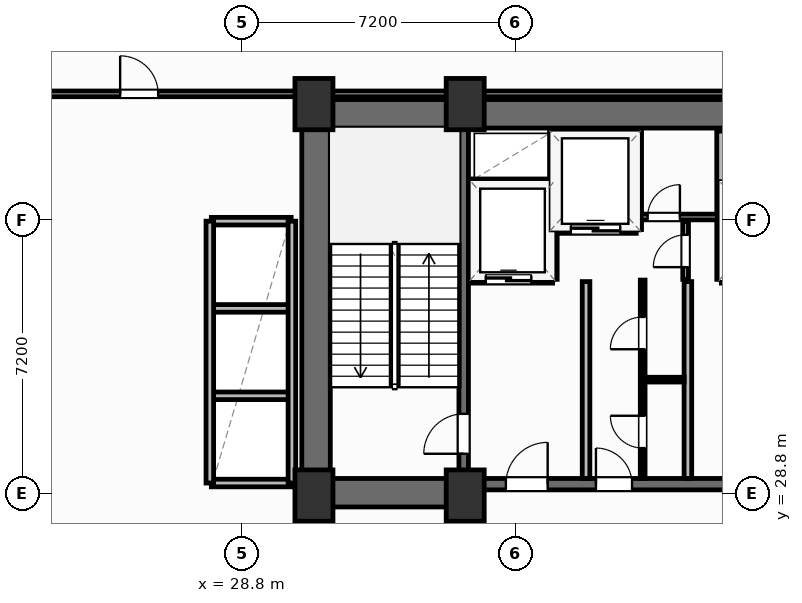
"""IFC4 building model, lengths in metres.
Left out: names, types, materials, properties, quantities, classifications, styles, units other than length and angle.
Written with IfcOpenShell. Run it as: python <this file> out.ifc"""

import sys

from ifc_helpers import new_model, si_unit, direction, frame, frame_2d, origin, origin_2d, place, context, subcontext, project, spatial, rectangle, extrude, element, fill, save


model = new_model("IFC4")
c1 = context("Model", 3, precision=1e-05, world=origin(), true_north=direction((0.0, 1.0)))
c2 = subcontext(c1, "Body", "Model", "MODEL_VIEW")
j1 = project(units=[si_unit("LENGTHUNIT", "METRE"), si_unit("PLANEANGLEUNIT", "RADIAN")], contexts=[c1])
p1 = place(None, origin())
s1 = spatial("IfcSite", under=j1, at=p1, CompositionType="ELEMENT")
p2 = place(p1, origin())
s2 = spatial("IfcBuilding", under=s1, at=p2, CompositionType="ELEMENT")
p3 = place(p2, frame((0.0, 0.0, 116.9)))
s3 = spatial("IfcBuildingStorey", under=s2, at=p3, CompositionType="ELEMENT", Elevation=116.9)
for number, where, z_axis, x_axis in (
    (1, (30.7, 28.75, 0.0), (0.0, 0.0, 1.0), (1.0, 0.0, 0.0)),
    (2, (34.68, 28.75, 0.0), (0.0, 0.0, 1.0), (1.0, 0.0, 0.0)),
    (3, (30.7, 39.05, 0.0), (0.0, 0.0, 1.0), (1.0, 0.0, 0.0)),
    (4, (34.68, 39.05, 0.0), (0.0, 0.0, 1.0), (1.0, 0.0, 0.0)),
):
    element("IfcColumn", number, at=place(p3, frame(where, z_axis=z_axis, x_axis=x_axis)), inside=s3, PredefinedType="COLUMN", context=c2, shape_type="SweptSolid", body=[
        extrude(rectangle(XDim=1.0, YDim=1.35, at=origin_2d()), origin(), (0.0, 0.0, 1.0), 4.8),
    ])
p4 = place(p3, frame((30.38, 38.795, 0.0), z_axis=(0.0, 0.0, 1.0), x_axis=(1.0, 0.0, 0.0)))
e5 = element("IfcWall", 5, at=p4, inside=s3, PredefinedType="SHEAR", context=c2, shape_type="SweptSolid", body=[
    extrude(rectangle(XDim=17.64, YDim=0.75, at=frame_2d((8.82, 0.0))), origin(), (0.0, 0.0, 1.0), 4.55),
])
p5 = place(p3, frame((30.755, 29.2, 0.0), z_axis=(0.0, 0.0, 1.0), x_axis=(0.0, 1.0, 0.0)))
e6 = element("IfcWall", 6, at=p5, inside=s3, PredefinedType="SHEAR", context=c2, shape_type="SweptSolid", body=[
    extrude(rectangle(XDim=9.22, YDim=0.75, at=frame_2d((4.61, 0.0))), origin(), (0.0, 0.0, 1.0), 4.55),
])
p6 = place(p3, frame((30.38, 28.825, 0.0), z_axis=(0.0, 0.0, 1.0), x_axis=(1.0, 0.0, 0.0)))
e7 = element("IfcWall", 7, at=p6, inside=s3, PredefinedType="SHEAR", context=c2, shape_type="SweptSolid", body=[
    extrude(rectangle(XDim=4.42, YDim=0.75, at=frame_2d((2.21, 0.0))), origin(), (0.0, 0.0, 1.0), 4.55),
])
p7 = place(p3, frame((34.8, 29.05, 0.0), z_axis=(0.0, 0.0, 1.0), x_axis=(1.0, 0.0, 0.0)))
e8 = element("IfcWall", 8, at=p7, inside=s3, PredefinedType="SHEAR", context=c2, shape_type="SweptSolid", body=[
    extrude(rectangle(XDim=8.8, YDim=0.3, at=frame_2d((4.4, 0.0))), origin(), (0.0, 0.0, 1.0), 4.55),
])
p8 = place(p7, frame((0.95, 0.0, 0.0)))
e9 = element("IfcOpeningElement", 9, at=p8, cuts=e8, PredefinedType="OPENING", context=c2, shape_type="SweptSolid", body=[
    extrude(rectangle(XDim=1.1, YDim=2.15, at=frame_2d((0.55, 1.075))), frame((0.0, 0.16, 0.0), z_axis=(0.0, -1.0, 0.0), x_axis=(1.0, 0.0, 0.0)), (0.0, 0.0, 1.0), 0.32),
])
p9 = place(p7, frame((6.75, 0.0, 0.0)))
e10 = element("IfcOpeningElement", 10, at=p9, cuts=e8, PredefinedType="OPENING", context=c2, shape_type="SweptSolid", body=[
    extrude(rectangle(XDim=1.1, YDim=2.15, at=frame_2d((0.55, 1.075))), frame((0.0, 0.16, 0.0), z_axis=(0.0, -1.0, 0.0), x_axis=(1.0, 0.0, 0.0)), (0.0, 0.0, 1.0), 0.32),
])
p10 = place(p7, frame((3.32, 0.0, 0.0)))
e11 = element("IfcOpeningElement", 11, at=p10, cuts=e8, PredefinedType="OPENING", context=c2, shape_type="SweptSolid", body=[
    extrude(rectangle(XDim=0.95, YDim=2.15, at=frame_2d((0.475, 1.075))), frame((0.0, 0.16, 0.0), z_axis=(0.0, -1.0, 0.0), x_axis=(1.0, 0.0, 0.0)), (0.0, 0.0, 1.0), 0.32),
])
p11 = place(p3, frame((34.64, 29.2, 0.0), z_axis=(0.0, 0.0, 1.0), x_axis=(0.0, 1.0, 0.0)))
e12 = element("IfcWall", 12, at=p11, inside=s3, PredefinedType="SHEAR", context=c2, shape_type="SweptSolid", body=[
    extrude(rectangle(XDim=9.22, YDim=0.25, at=frame_2d((4.61, 0.0))), origin(), (0.0, 0.0, 1.0), 4.55),
])
p12 = place(p11, frame((0.65, 0.0, 0.0)))
e13 = element("IfcOpeningElement", 13, at=p12, cuts=e12, PredefinedType="OPENING", context=c2, shape_type="SweptSolid", body=[
    extrude(rectangle(XDim=1.05, YDim=2.15, at=frame_2d((0.525, 1.075))), frame((0.0, 0.135, 0.0), z_axis=(0.0, -1.0, 0.0), x_axis=(1.0, 0.0, 0.0)), (0.0, 0.0, 1.0), 0.27),
])
p13 = place(p3, frame((10.0, 39.32, 0.0), z_axis=(0.0, 0.0, 1.0), x_axis=(1.0, 0.0, 0.0)))
e14 = element("IfcWall", 14, at=p13, inside=s3, PredefinedType="PARTITIONING", context=c2, shape_type="SweptSolid", body=[
    extrude(rectangle(XDim=62.0, YDim=0.15, at=frame_2d((31.0, 0.0))), origin(), (0.0, 0.0, 1.0), 4.55),
])
p14 = place(p13, frame((15.6, 0.0, 0.0)))
e15 = element("IfcOpeningElement", 15, at=p14, cuts=e14, PredefinedType="OPENING", context=c2, shape_type="SweptSolid", body=[
    extrude(rectangle(XDim=1.0, YDim=2.05, at=frame_2d((0.5, 1.025))), frame((0.0, 0.085, 0.0), z_axis=(0.0, -1.0, 0.0), x_axis=(1.0, 0.0, 0.0)), (0.0, 0.0, 1.0), 0.17),
])
p15 = place(p13, frame((39.5, 0.0, 0.0)))
e16 = element("IfcOpeningElement", 16, at=p15, cuts=e14, PredefinedType="OPENING", context=c2, shape_type="SweptSolid", body=[
    extrude(rectangle(XDim=2.0, YDim=2.05, at=frame_2d((1.0, 1.025))), frame((0.0, 0.085, 0.0), z_axis=(0.0, -1.0, 0.0), x_axis=(1.0, 0.0, 0.0)), (0.0, 0.0, 1.0), 0.17),
])
for number, where, z_axis, x_axis in (
    (17, (37.86, 29.2, 0.0), (0.0, 0.0, 1.0), (0.0, 1.0, 0.0)),
    (18, (40.54, 29.2, 0.0), (0.0, 0.0, 1.0), (0.0, 1.0, 0.0)),
):
    element("IfcWall", number, at=place(p3, frame(where, z_axis=z_axis, x_axis=x_axis)), inside=s3, PredefinedType="PARTITIONING", context=c2, shape_type="SweptSolid", body=[
        extrude(rectangle(XDim=5.18, YDim=0.2, at=frame_2d((2.59, 0.0))), origin(), (0.0, 0.0, 1.0), 4.55),
    ])
p16 = place(p3, frame((34.8, 34.44, 0.0), z_axis=(0.0, 0.0, 1.0), x_axis=(1.0, 0.0, 0.0)))
e19 = element("IfcWall", 19, at=p16, inside=s3, PredefinedType="PARTITIONING", context=c2, shape_type="SweptSolid", body=[
    extrude(rectangle(XDim=2.18, YDim=0.2, at=frame_2d((1.09, 0.0))), origin(), (0.0, 0.0, 1.0), 4.55),
])
p17 = place(p16, frame((0.42, 0.0, 0.0)))
e20 = element("IfcOpeningElement", 20, at=p17, cuts=e19, PredefinedType="OPENING", context=c2, shape_type="SweptSolid", body=[
    extrude(rectangle(XDim=1.2, YDim=2.2, at=frame_2d((0.6, 1.1))), frame((0.0, 0.11, 0.0), z_axis=(0.0, -1.0, 0.0), x_axis=(1.0, 0.0, 0.0)), (0.0, 0.0, 1.0), 0.22),
])
p18 = place(p3, frame((34.8, 36.98, 0.0), z_axis=(0.0, 0.0, 1.0), x_axis=(1.0, 0.0, 0.0)))
e21 = element("IfcWall", 21, at=p18, inside=s3, PredefinedType="PARTITIONING", context=c2, shape_type="SweptSolid", body=[
    extrude(rectangle(XDim=2.18, YDim=0.2, at=frame_2d((1.09, 0.0))), origin(), (0.0, 0.0, 1.0), 4.55),
])
for number, where, z_axis, x_axis in (
    (22, (37.0, 34.44, 0.0), (0.0, 0.0, 1.0), (0.0, 1.0, 0.0)),
    (23, (41.4, 34.44, 0.0), (0.0, 0.0, 1.0), (0.0, 1.0, 0.0)),
):
    element("IfcWall", number, at=place(p3, frame(where, z_axis=z_axis, x_axis=x_axis)), inside=s3, PredefinedType="PARTITIONING", context=c2, shape_type="SweptSolid", body=[
        extrude(rectangle(XDim=3.9, YDim=0.2, at=frame_2d((1.95, 0.0))), origin(), (0.0, 0.0, 1.0), 4.55),
    ])
p19 = place(p3, frame((37.06, 35.75, 0.0), z_axis=(0.0, 0.0, 1.0), x_axis=(1.0, 0.0, 0.0)))
e24 = element("IfcWall", 24, at=p19, inside=s3, PredefinedType="PARTITIONING", context=c2, shape_type="SweptSolid", body=[
    extrude(rectangle(XDim=2.12, YDim=0.2, at=frame_2d((1.06, 0.0))), origin(), (0.0, 0.0, 1.0), 4.55),
])
p20 = place(p19, frame((0.4, 0.0, 0.0)))
e25 = element("IfcOpeningElement", 25, at=p20, cuts=e24, PredefinedType="OPENING", context=c2, shape_type="SweptSolid", body=[
    extrude(rectangle(XDim=1.3, YDim=2.2, at=frame_2d((0.65, 1.1))), frame((0.0, 0.11, 0.0), z_axis=(0.0, -1.0, 0.0), x_axis=(1.0, 0.0, 0.0)), (0.0, 0.0, 1.0), 0.22),
])
p21 = place(p3, frame((39.22, 35.75, 0.0), z_axis=(0.0, 0.0, 1.0), x_axis=(0.0, 1.0, 0.0)))
e26 = element("IfcWall", 26, at=p21, inside=s3, PredefinedType="PARTITIONING", context=c2, shape_type="SweptSolid", body=[
    extrude(rectangle(XDim=2.59, YDim=0.2, at=frame_2d((1.295, 0.0))), origin(), (0.0, 0.0, 1.0), 4.55),
])
p22 = place(p3, frame((39.3, 36.08, 0.0), z_axis=(0.0, 0.0, 1.0), x_axis=(1.0, 0.0, 0.0)))
e27 = element("IfcWall", 27, at=p22, inside=s3, PredefinedType="PARTITIONING", context=c2, shape_type="SweptSolid", body=[
    extrude(rectangle(XDim=2.02, YDim=0.15, at=frame_2d((1.01, 0.0))), origin(), (0.0, 0.0, 1.0), 4.55),
])
p23 = place(p22, frame((0.18, 0.0, 0.0)))
e28 = element("IfcOpeningElement", 28, at=p23, cuts=e27, PredefinedType="OPENING", context=c2, shape_type="SweptSolid", body=[
    extrude(rectangle(XDim=0.85, YDim=2.05, at=frame_2d((0.425, 1.025))), frame((0.0, 0.085, 0.0), z_axis=(0.0, -1.0, 0.0), x_axis=(1.0, 0.0, 0.0)), (0.0, 0.0, 1.0), 0.17),
])
p24 = place(p3, frame((40.48, 34.44, 0.0), z_axis=(0.0, 0.0, 1.0), x_axis=(0.0, 1.0, 0.0)))
e29 = element("IfcWall", 29, at=p24, inside=s3, PredefinedType="PARTITIONING", context=c2, shape_type="SweptSolid", body=[
    extrude(rectangle(XDim=1.52, YDim=0.15, at=frame_2d((0.76, 0.0))), origin(), (0.0, 0.0, 1.0), 4.55),
])
p25 = place(p24, frame((0.32, 0.0, 0.0)))
e30 = element("IfcOpeningElement", 30, at=p25, cuts=e29, PredefinedType="OPENING", context=c2, shape_type="SweptSolid", body=[
    extrude(rectangle(XDim=0.85, YDim=2.05, at=frame_2d((0.425, 1.025))), frame((0.0, 0.085, 0.0), z_axis=(0.0, -1.0, 0.0), x_axis=(1.0, 0.0, 0.0)), (0.0, 0.0, 1.0), 0.17),
])
p26 = place(p3, frame((39.35, 31.8, 0.0), z_axis=(0.0, 0.0, 1.0), x_axis=(1.0, 0.0, 0.0)))
e31 = element("IfcWall", 31, at=p26, inside=s3, PredefinedType="PARTITIONING", context=c2, shape_type="SweptSolid", body=[
    extrude(rectangle(XDim=1.09, YDim=0.125, at=frame_2d((0.545, 0.0))), origin(), (0.0, 0.0, 1.0), 4.55),
])
p27 = place(p3, frame((39.35, 29.2, 0.0), z_axis=(0.0, 0.0, 1.0), x_axis=(0.0, 1.0, 0.0)))
e32 = element("IfcWall", 32, at=p27, inside=s3, PredefinedType="PARTITIONING", context=c2, shape_type="SweptSolid", body=[
    extrude(rectangle(XDim=5.22, YDim=0.125, at=frame_2d((2.61, 0.0))), origin(), (0.0, 0.0, 1.0), 4.55),
])
p28 = place(p27, frame((0.8, 0.0, 0.0)))
e33 = element("IfcOpeningElement", 33, at=p28, cuts=e32, PredefinedType="OPENING", context=c2, shape_type="SweptSolid", body=[
    extrude(rectangle(XDim=0.85, YDim=2.05, at=frame_2d((0.425, 1.025))), frame((0.0, 0.073, 0.0), z_axis=(0.0, -1.0, 0.0), x_axis=(1.0, 0.0, 0.0)), (0.0, 0.0, 1.0), 0.145),
])
p29 = place(p27, frame((3.4, 0.0, 0.0)))
e34 = element("IfcOpeningElement", 34, at=p29, cuts=e32, PredefinedType="OPENING", context=c2, shape_type="SweptSolid", body=[
    extrude(rectangle(XDim=0.85, YDim=2.05, at=frame_2d((0.425, 1.025))), frame((0.0, 0.073, 0.0), z_axis=(0.0, -1.0, 0.0), x_axis=(1.0, 0.0, 0.0)), (0.0, 0.0, 1.0), 0.145),
])
for number, where, z_axis, x_axis in (
    (35, (28.02, 31.375, 0.0), (0.0, 0.0, 1.0), (1.0, 0.0, 0.0)),
    (36, (28.02, 33.675, 0.0), (0.0, 0.0, 1.0), (1.0, 0.0, 0.0)),
):
    element("IfcWall", number, at=place(p3, frame(where, z_axis=z_axis, x_axis=x_axis)), inside=s3, PredefinedType="PARTITIONING", context=c2, shape_type="SweptSolid", body=[
        extrude(rectangle(XDim=2.06, YDim=0.2, at=frame_2d((1.03, 0.0))), origin(), (0.0, 0.0, 1.0), 4.55),
    ])
for number, where, z_axis, x_axis in (
    (37, (28.0, 29.08, 0.0), (0.0, 0.0, 1.0), (1.0, 0.0, 0.0)),
    (38, (28.0, 35.97, 0.0), (0.0, 0.0, 1.0), (1.0, 0.0, 0.0)),
):
    element("IfcWall", number, at=place(p3, frame(where, z_axis=z_axis, x_axis=x_axis)), inside=s3, PredefinedType="PARTITIONING", context=c2, shape_type="SweptSolid", body=[
        extrude(rectangle(XDim=2.1, YDim=0.2, at=frame_2d((1.05, 0.0))), origin(), (0.0, 0.0, 1.0), 4.55),
    ])
for number, where, z_axis, x_axis in (
    (39, (30.12, 29.08, 0.0), (0.0, 0.0, 1.0), (0.0, 1.0, 0.0)),
    (40, (27.96, 29.08, 0.0), (0.0, 0.0, 1.0), (0.0, 1.0, 0.0)),
):
    element("IfcWall", number, at=place(p3, frame(where, z_axis=z_axis, x_axis=x_axis)), inside=s3, PredefinedType="PARTITIONING", context=c2, shape_type="SweptSolid", body=[
        extrude(rectangle(XDim=6.89, YDim=0.2, at=frame_2d((3.445, 0.0))), origin(), (0.0, 0.0, 1.0), 4.55),
    ])
p30 = place(p14, origin())
e41 = element("IfcDoor", 41, at=p30, inside=s3, OperationType="SINGLE_SWING_LEFT", PredefinedType="DOOR", context=c2, shape_type="SweptSolid", body=[
    extrude(rectangle(XDim=1.0, YDim=2.05, at=frame_2d((0.5, 1.025))), frame((0.0, 0.025, 0.0), z_axis=(0.0, -1.0, 0.0), x_axis=(1.0, 0.0, 0.0)), (0.0, 0.0, 1.0), 0.05),
])
fill(e15, e41)
p31 = place(p12, origin())
e42 = element("IfcDoor", 42, at=p31, inside=s3, OperationType="SINGLE_SWING_LEFT", PredefinedType="DOOR", context=c2, shape_type="SweptSolid", body=[
    extrude(rectangle(XDim=1.05, YDim=2.15, at=frame_2d((0.525, 1.075))), frame((0.0, 0.025, 0.0), z_axis=(0.0, -1.0, 0.0), x_axis=(1.0, 0.0, 0.0)), (0.0, 0.0, 1.0), 0.05),
])
fill(e13, e42)
p32 = place(p8, origin())
e43 = element("IfcDoor", 43, at=p32, inside=s3, OperationType="SINGLE_SWING_RIGHT", PredefinedType="DOOR", context=c2, shape_type="SweptSolid", body=[
    extrude(rectangle(XDim=1.1, YDim=2.15, at=frame_2d((0.55, 1.075))), frame((0.0, 0.025, 0.0), z_axis=(0.0, -1.0, 0.0), x_axis=(1.0, 0.0, 0.0)), (0.0, 0.0, 1.0), 0.05),
])
fill(e9, e43)
p33 = place(p17, origin())
e44 = element("IfcDoor", 44, at=p33, inside=s3, OperationType="SLIDING_TO_LEFT", PredefinedType="DOOR", context=c2, shape_type="SweptSolid", body=[
    extrude(rectangle(XDim=1.2, YDim=2.2, at=frame_2d((0.6, 1.1))), frame((0.0, 0.025, 0.0), z_axis=(0.0, -1.0, 0.0), x_axis=(1.0, 0.0, 0.0)), (0.0, 0.0, 1.0), 0.05),
])
fill(e20, e44)
p34 = place(p20, origin())
e45 = element("IfcDoor", 45, at=p34, inside=s3, OperationType="SLIDING_TO_LEFT", PredefinedType="DOOR", context=c2, shape_type="SweptSolid", body=[
    extrude(rectangle(XDim=1.3, YDim=2.2, at=frame_2d((0.65, 1.1))), frame((0.0, 0.025, 0.0), z_axis=(0.0, -1.0, 0.0), x_axis=(1.0, 0.0, 0.0)), (0.0, 0.0, 1.0), 0.05),
])
fill(e25, e45)
p35 = place(p23, origin())
e46 = element("IfcDoor", 46, at=p35, inside=s3, OperationType="SINGLE_SWING_RIGHT", PredefinedType="DOOR", context=c2, shape_type="SweptSolid", body=[
    extrude(rectangle(XDim=0.85, YDim=2.05, at=frame_2d((0.425, 1.025))), frame((0.0, 0.025, 0.0), z_axis=(0.0, -1.0, 0.0), x_axis=(1.0, 0.0, 0.0)), (0.0, 0.0, 1.0), 0.05),
])
fill(e28, e46)
p36 = place(p25, origin())
e47 = element("IfcDoor", 47, at=p36, inside=s3, OperationType="SINGLE_SWING_LEFT", PredefinedType="DOOR", context=c2, shape_type="SweptSolid", body=[
    extrude(rectangle(XDim=0.85, YDim=2.05, at=frame_2d((0.425, 1.025))), frame((0.0, 0.025, 0.0), z_axis=(0.0, -1.0, 0.0), x_axis=(1.0, 0.0, 0.0)), (0.0, 0.0, 1.0), 0.05),
])
fill(e30, e47)
p37 = place(p28, origin())
e48 = element("IfcDoor", 48, at=p37, inside=s3, OperationType="SINGLE_SWING_RIGHT", PredefinedType="DOOR", context=c2, shape_type="SweptSolid", body=[
    extrude(rectangle(XDim=0.85, YDim=2.05, at=frame_2d((0.425, 1.025))), frame((0.0, 0.025, 0.0), z_axis=(0.0, -1.0, 0.0), x_axis=(1.0, 0.0, 0.0)), (0.0, 0.0, 1.0), 0.05),
])
fill(e33, e48)
p38 = place(p29, origin())
e49 = element("IfcDoor", 49, at=p38, inside=s3, OperationType="SINGLE_SWING_LEFT", PredefinedType="DOOR", context=c2, shape_type="SweptSolid", body=[
    extrude(rectangle(XDim=0.85, YDim=2.05, at=frame_2d((0.425, 1.025))), frame((0.0, 0.025, 0.0), z_axis=(0.0, -1.0, 0.0), x_axis=(1.0, 0.0, 0.0)), (0.0, 0.0, 1.0), 0.05),
])
fill(e34, e49)
p39 = place(p10, origin())
e50 = element("IfcDoor", 50, at=p39, inside=s3, OperationType="SINGLE_SWING_LEFT", PredefinedType="DOOR", context=c2, shape_type="SweptSolid", body=[
    extrude(rectangle(XDim=0.95, YDim=2.15, at=frame_2d((0.475, 1.075))), frame((0.0, 0.025, 0.0), z_axis=(0.0, -1.0, 0.0), x_axis=(1.0, 0.0, 0.0)), (0.0, 0.0, 1.0), 0.05),
])
fill(e11, e50)
save(model, sys.argv[1])
